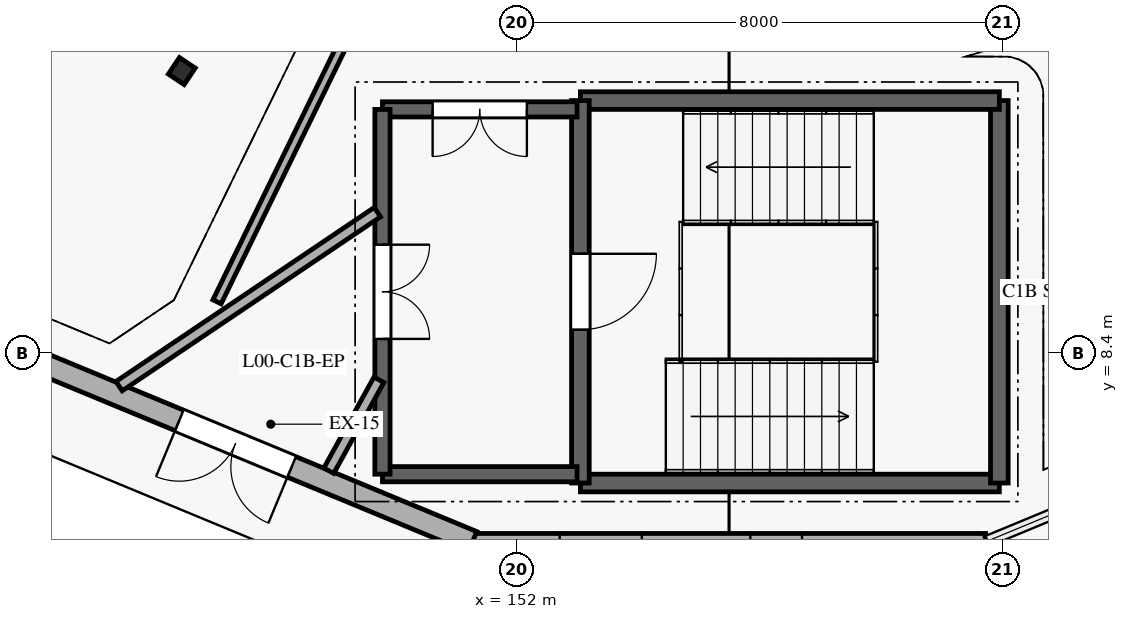
"""IFC4 building model, lengths in metres.
Left out: names, types, materials, properties, quantities, classifications, styles, units other than length and angle.
Written with IfcOpenShell. Run it as: python <this file> out.ifc"""

import sys

from ifc_helpers import new_model, si_unit, direction, frame, frame_2d, origin, origin_2d, place, context, subcontext, project, spatial, rectangle, i_section, extrude, element, fill, save


model = new_model("IFC4")
c1 = context("Model", 3, precision=1e-05, world=origin(), true_north=direction((0.0, 1.0)))
c2 = subcontext(c1, "Body", "Model", "MODEL_VIEW")
j1 = project(units=[si_unit("LENGTHUNIT", "METRE"), si_unit("PLANEANGLEUNIT", "RADIAN")], contexts=[c1])
p1 = place(None, origin())
s1 = spatial("IfcSite", under=j1, at=p1, CompositionType="ELEMENT")
p2 = place(p1, origin())
s2 = spatial("IfcBuilding", under=s1, at=p2, CompositionType="ELEMENT")
p3 = place(p2, origin())
s3 = spatial("IfcBuildingStorey", under=s2, at=p3, CompositionType="ELEMENT", Elevation=0.0)
p4 = place(p3, frame((146.5, 13.03, 0.0), z_axis=(0.0, 0.0, 1.0), x_axis=(0.831469612303, -0.55557023302, 0.0)))
e1 = element("IfcColumn", 1, at=p4, inside=s3, PredefinedType="COLUMN", context=c2, shape_type="SweptSolid", body=[
    extrude(i_section(OverallWidth=0.311, OverallDepth=0.327, WebThickness=0.016, FlangeThickness=0.025, FilletRadius=0.015, at=origin_2d()), origin(), (0.0, 0.0, 1.0), 4.2),
])
p5 = place(p3, frame((159.719, 5.288, 0.0), z_axis=(0.0, 0.0, 1.0), x_axis=(-1.0, 0.0, 0.0)))
e2 = element("IfcWall", 2, at=p5, inside=s3, PredefinedType="SOLIDWALL", context=c2, shape_type="SweptSolid", body=[
    extrude(rectangle(XDim=8.438, YDim=0.275, at=frame_2d((4.219, 0.0))), origin(), (0.0, 0.0, 1.0), 3.94),
])
p6 = place(p5, frame((3.019, 0.0, 0.85)))
e3 = element("IfcOpeningElement", 3, at=p6, cuts=e2, PredefinedType="OPENING", context=c2, shape_type="SweptSolid", body=[
    extrude(rectangle(XDim=0.85, YDim=1.4, at=frame_2d((0.425, 0.7))), frame((0.0, 0.147, 0.0), z_axis=(0.0, -1.0, 0.0), x_axis=(1.0, 0.0, 0.0)), (0.0, 0.0, 1.0), 0.295),
])
p7 = place(p5, frame((5.654, 0.0, 0.85)))
e4 = element("IfcOpeningElement", 4, at=p7, cuts=e2, PredefinedType="OPENING", context=c2, shape_type="SweptSolid", body=[
    extrude(rectangle(XDim=1.35, YDim=1.3, at=frame_2d((0.675, 0.65))), frame((0.0, 0.147, 0.0), z_axis=(0.0, -1.0, 0.0), x_axis=(1.0, 0.0, 0.0)), (0.0, 0.0, 1.0), 0.295),
])
p8 = place(p3, frame((151.281, 5.288, 0.0), z_axis=(0.0, 0.0, 1.0), x_axis=(-0.923884604839, 0.382671186453, 0.0)))
e5 = element("IfcWall", 5, at=p8, inside=s3, PredefinedType="SOLIDWALL", context=c2, shape_type="SweptSolid", body=[
    extrude(rectangle(XDim=8.439, YDim=0.365, at=frame_2d((4.219, 0.0))), origin(), (0.0, 0.0, 1.0), 3.94),
])
p9 = place(p8, frame((3.219, 0.0, 0.0)))
e6 = element("IfcOpeningElement", 6, at=p9, cuts=e5, PredefinedType="OPENING", context=c2, shape_type="SweptSolid", body=[
    extrude(rectangle(XDim=2.0, YDim=2.2, at=frame_2d((1.0, 1.1))), frame((0.0, 0.192, 0.0), z_axis=(0.0, -1.0, 0.0), x_axis=(1.0, 0.0, 0.0)), (0.0, 0.0, 1.0), 0.385),
])
p10 = place(p3, frame((160.308, 4.27, 0.0), z_axis=(0.0, 0.0, 1.0), x_axis=(0.923871890562, 0.382701881142, 0.0)))
e7 = element("IfcWall", 7, at=p10, inside=s3, PredefinedType="ELEMENTEDWALL", context=c2, shape_type="SweptSolid", body=[
    extrude(rectangle(XDim=8.13, YDim=0.225, at=frame_2d((4.065, 0.0))), origin(), (0.0, 0.0, 1.0), 0.55),
])
p11 = place(p3, frame((153.055, 6.255, 0.0), z_axis=(0.0, 0.0, 1.0), x_axis=(1.0, 0.0, 0.0)))
e8 = element("IfcWall", 8, at=p11, inside=s3, PredefinedType="SHEAR", context=c2, shape_type="SweptSolid", body=[
    extrude(rectangle(XDim=6.89, YDim=0.29, at=frame_2d((3.445, 0.0))), origin(), (0.0, 0.0, 1.0), 3.95),
])
p12 = place(p3, frame((159.945, 6.255, 0.0), z_axis=(0.0, 0.0, 1.0), x_axis=(0.0, 1.0, 0.0)))
e9 = element("IfcWall", 9, at=p12, inside=s3, PredefinedType="SHEAR", context=c2, shape_type="SweptSolid", body=[
    extrude(rectangle(XDim=6.29, YDim=0.29, at=frame_2d((3.145, 0.0))), origin(), (0.0, 0.0, 1.0), 3.95),
])
p13 = place(p3, frame((159.945, 12.545, 0.0), z_axis=(0.0, 0.0, 1.0), x_axis=(-1.0, 0.0, 0.0)))
e10 = element("IfcWall", 10, at=p13, inside=s3, PredefinedType="SHEAR", context=c2, shape_type="SweptSolid", body=[
    extrude(rectangle(XDim=6.89, YDim=0.29, at=frame_2d((3.445, 0.0))), origin(), (0.0, 0.0, 1.0), 3.95),
])
p14 = place(p3, frame((153.055, 12.545, 0.0), z_axis=(0.0, 0.0, 1.0), x_axis=(0.0, -1.0, 0.0)))
e11 = element("IfcWall", 11, at=p14, inside=s3, PredefinedType="SHEAR", context=c2, shape_type="SweptSolid", body=[
    extrude(rectangle(XDim=6.29, YDim=0.29, at=frame_2d((3.145, 0.0))), origin(), (0.0, 0.0, 1.0), 3.95),
])
p15 = place(p14, frame((2.52, 0.0, 0.0)))
e12 = element("IfcOpeningElement", 12, at=p15, cuts=e11, PredefinedType="OPENING", context=c2, shape_type="SweptSolid", body=[
    extrude(rectangle(XDim=1.25, YDim=2.1, at=frame_2d((0.625, 1.05))), frame((0.0, 0.155, 0.0), z_axis=(0.0, -1.0, 0.0), x_axis=(1.0, 0.0, 0.0)), (0.0, 0.0, 1.0), 0.31),
])
p16 = place(p3, frame((149.8, 6.4, 0.0), z_axis=(0.0, 0.0, 1.0), x_axis=(1.0, 0.0, 0.0)))
e13 = element("IfcWall", 13, at=p16, inside=s3, PredefinedType="SHEAR", context=c2, shape_type="SweptSolid", body=[
    extrude(rectangle(XDim=3.2, YDim=0.25, at=frame_2d((1.6, 0.0))), origin(), (0.0, 0.0, 1.0), 3.95),
])
p17 = place(p3, frame((153.0, 12.4, 0.0), z_axis=(0.0, 0.0, 1.0), x_axis=(-1.0, 0.0, 0.0)))
e14 = element("IfcWall", 14, at=p17, inside=s3, PredefinedType="SHEAR", context=c2, shape_type="SweptSolid", body=[
    extrude(rectangle(XDim=3.2, YDim=0.25, at=frame_2d((1.6, 0.0))), origin(), (0.0, 0.0, 1.0), 3.95),
])
p18 = place(p17, frame((0.825, 0.0, 0.0)))
e15 = element("IfcOpeningElement", 15, at=p18, cuts=e14, PredefinedType="OPENING", context=c2, shape_type="SweptSolid", body=[
    extrude(rectangle(XDim=1.55, YDim=2.15, at=frame_2d((0.775, 1.075))), frame((0.0, 0.135, 0.0), z_axis=(0.0, -1.0, 0.0), x_axis=(1.0, 0.0, 0.0)), (0.0, 0.0, 1.0), 0.27),
])
p19 = place(p3, frame((149.8, 12.4, 0.0), z_axis=(0.0, 0.0, 1.0), x_axis=(0.0, -1.0, 0.0)))
e16 = element("IfcWall", 16, at=p19, inside=s3, PredefinedType="SHEAR", context=c2, shape_type="SweptSolid", body=[
    extrude(rectangle(XDim=6.0, YDim=0.25, at=frame_2d((3.0, 0.0))), origin(), (0.0, 0.0, 1.0), 3.95),
])
p20 = place(p19, frame((2.225, 0.0, 0.0)))
e17 = element("IfcOpeningElement", 17, at=p20, cuts=e16, PredefinedType="OPENING", context=c2, shape_type="SweptSolid", body=[
    extrude(rectangle(XDim=1.55, YDim=2.15, at=frame_2d((0.775, 1.075))), frame((0.0, 0.135, 0.0), z_axis=(0.0, -1.0, 0.0), x_axis=(1.0, 0.0, 0.0)), (0.0, 0.0, 1.0), 0.27),
])
p21 = place(p3, frame((149.716, 10.71, 0.0), z_axis=(0.0, 0.0, 1.0), x_axis=(-0.829326933292, -0.55876366893, 0.0)))
e18 = element("IfcWall", 18, at=p21, inside=s3, PredefinedType="PARTITIONING", context=c2, shape_type="SweptSolid", body=[
    extrude(rectangle(XDim=5.122, YDim=0.185, at=frame_2d((2.561, 0.0))), origin(), (0.0, 0.0, 1.0), 3.915),
])
p22 = place(p3, frame((148.917, 6.458, 0.0), z_axis=(0.0, 0.0, 1.0), x_axis=(0.48271443194, 0.875777812688, 0.0)))
e19 = element("IfcWall", 19, at=p22, inside=s3, PredefinedType="PARTITIONING", context=c2, shape_type="SweptSolid", body=[
    extrude(rectangle(XDim=1.708, YDim=0.185, at=frame_2d((0.854, 0.0))), origin(), (0.0, 0.0, 1.0), 3.915),
])
p23 = place(p3, frame((147.079, 9.235, 0.0), z_axis=(0.0, 0.0, 1.0), x_axis=(0.438378395159, 0.898790510997, 0.0)))
e20 = element("IfcWall", 20, at=p23, inside=s3, PredefinedType="PARTITIONING", context=c2, shape_type="SweptSolid", body=[
    extrude(rectangle(XDim=6.061, YDim=0.15, at=frame_2d((3.031, 0.0))), origin(), (0.0, 0.0, 1.0), 3.915),
])
p24 = place(p9, origin())
e21 = element("IfcDoor", 21, at=p24, inside=s3, OperationType="DOUBLE_DOOR_SINGLE_SWING", PredefinedType="DOOR", context=c2, shape_type="SweptSolid", body=[
    extrude(rectangle(XDim=2.0, YDim=2.2, at=frame_2d((1.0, 1.1))), frame((0.0, 0.025, 0.0), z_axis=(0.0, -1.0, 0.0), x_axis=(1.0, 0.0, 0.0)), (0.0, 0.0, 1.0), 0.05),
])
fill(e6, e21)
p25 = place(p15, frame((1.25, 0.0, 0.0), z_axis=(0.0, 0.0, 1.0), x_axis=(-1.0, 0.0, 0.0)))
e22 = element("IfcDoor", 22, at=p25, inside=s3, OperationType="SINGLE_SWING_LEFT", PredefinedType="DOOR", context=c2, shape_type="SweptSolid", body=[
    extrude(rectangle(XDim=1.25, YDim=2.1, at=frame_2d((0.625, 1.05))), frame((0.0, 0.025, 0.0), z_axis=(0.0, -1.0, 0.0), x_axis=(1.0, 0.0, 0.0)), (0.0, 0.0, 1.0), 0.05),
])
fill(e12, e22)
p26 = place(p18, frame((1.55, 0.0, 0.0), z_axis=(0.0, 0.0, 1.0), x_axis=(-1.0, 0.0, 0.0)))
e23 = element("IfcDoor", 23, at=p26, inside=s3, OperationType="DOUBLE_DOOR_SINGLE_SWING", PredefinedType="DOOR", context=c2, shape_type="SweptSolid", body=[
    extrude(rectangle(XDim=1.55, YDim=2.15, at=frame_2d((0.775, 1.075))), frame((0.0, 0.025, 0.0), z_axis=(0.0, -1.0, 0.0), x_axis=(1.0, 0.0, 0.0)), (0.0, 0.0, 1.0), 0.05),
])
fill(e15, e23)
p27 = place(p20, frame((1.55, 0.0, 0.0), z_axis=(0.0, 0.0, 1.0), x_axis=(-1.0, 0.0, 0.0)))
e24 = element("IfcDoor", 24, at=p27, inside=s3, OperationType="DOUBLE_DOOR_SINGLE_SWING", PredefinedType="DOOR", context=c2, shape_type="SweptSolid", body=[
    extrude(rectangle(XDim=1.55, YDim=2.15, at=frame_2d((0.775, 1.075))), frame((0.0, 0.025, 0.0), z_axis=(0.0, -1.0, 0.0), x_axis=(1.0, 0.0, 0.0)), (0.0, 0.0, 1.0), 0.05),
])
fill(e17, e24)
save(model, sys.argv[1])
